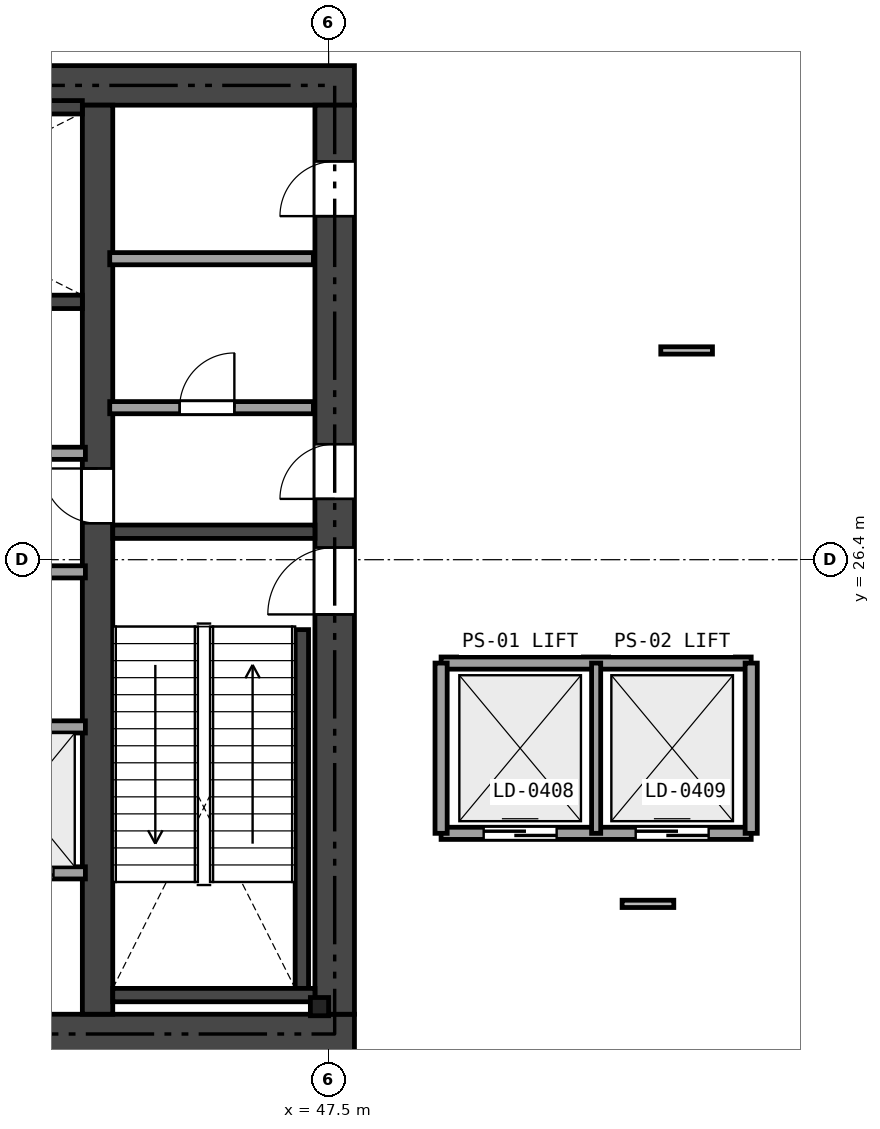
"""IFC4 building model, lengths in metres.
Left out: names, types, materials, properties, quantities, classifications, styles, units other than length and angle.
Written with IfcOpenShell. Run it as: python <this file> out.ifc"""

import sys

from ifc_helpers import new_model, si_unit, direction, frame, frame_2d, origin, origin_2d, place, context, subcontext, project, spatial, rectangle, i_section, extrude, element, fill, save


model = new_model("IFC4")
c1 = context("Model", 3, precision=1e-05, world=origin(), true_north=direction((0.0, 1.0)))
c2 = subcontext(c1, "Body", "Model", "MODEL_VIEW")
j1 = project(units=[si_unit("LENGTHUNIT", "METRE"), si_unit("PLANEANGLEUNIT", "RADIAN")], contexts=[c1])
p1 = place(None, origin())
s1 = spatial("IfcSite", under=j1, at=p1, CompositionType="ELEMENT")
p2 = place(p1, origin())
s2 = spatial("IfcBuilding", under=s1, at=p2, CompositionType="ELEMENT")
p3 = place(p2, frame((0.0, 0.0, 21.6)))
s3 = spatial("IfcBuildingStorey", under=s2, at=p3, CompositionType="ELEMENT", Elevation=21.6)
p4 = place(p3, frame((26.475, 18.6, 0.0), z_axis=(0.0, 0.0, 1.0), x_axis=(1.0, 0.0, 0.0)))
e1 = element("IfcWall", 1, at=p4, inside=s3, PredefinedType="SHEAR", context=c2, shape_type="SweptSolid", body=[
    extrude(rectangle(XDim=21.45, YDim=0.65, at=frame_2d((10.725, 0.0))), origin(), (0.0, 0.0, 1.0), 4.98),
])
p5 = place(p4, frame((12.45, 0.0, 0.0)))
e2 = element("IfcOpeningElement", 2, at=p5, cuts=e1, PredefinedType="OPENING", context=c2, shape_type="SweptSolid", body=[
    extrude(rectangle(XDim=1.15, YDim=2.15, at=frame_2d((0.575, 1.075))), frame((0.0, 0.335, 0.0), z_axis=(0.0, -1.0, 0.0), x_axis=(1.0, 0.0, 0.0)), (0.0, 0.0, 1.0), 0.67),
])
p6 = place(p4, frame((5.275, 0.0, 0.0)))
e3 = element("IfcOpeningElement", 3, at=p6, cuts=e1, PredefinedType="OPENING", context=c2, shape_type="SweptSolid", body=[
    extrude(rectangle(XDim=0.9, YDim=2.1, at=frame_2d((0.45, 1.05))), frame((0.0, 0.335, 0.0), z_axis=(0.0, -1.0, 0.0), x_axis=(1.0, 0.0, 0.0)), (0.0, 0.0, 1.0), 0.67),
])
p7 = place(p3, frame((26.475, 34.2, 0.0), z_axis=(0.0, 0.0, 1.0), x_axis=(1.0, 0.0, 0.0)))
e4 = element("IfcWall", 4, at=p7, inside=s3, PredefinedType="SHEAR", context=c2, shape_type="SweptSolid", body=[
    extrude(rectangle(XDim=21.45, YDim=0.65, at=frame_2d((10.725, 0.0))), origin(), (0.0, 0.0, 1.0), 4.98),
])
p8 = place(p7, frame((9.725, 0.0, 0.0)))
e5 = element("IfcOpeningElement", 5, at=p8, cuts=e4, PredefinedType="OPENING", context=c2, shape_type="SweptSolid", body=[
    extrude(rectangle(XDim=1.1, YDim=2.15, at=frame_2d((0.55, 1.075))), frame((0.0, 0.335, 0.0), z_axis=(0.0, -1.0, 0.0), x_axis=(1.0, 0.0, 0.0)), (0.0, 0.0, 1.0), 0.67),
])
p9 = place(p7, frame((1.975, 0.0, 0.0)))
e6 = element("IfcOpeningElement", 6, at=p9, cuts=e4, PredefinedType="OPENING", context=c2, shape_type="SweptSolid", body=[
    extrude(rectangle(XDim=0.9, YDim=2.1, at=frame_2d((0.45, 1.05))), frame((0.0, 0.335, 0.0), z_axis=(0.0, -1.0, 0.0), x_axis=(1.0, 0.0, 0.0)), (0.0, 0.0, 1.0), 0.67),
])
p10 = place(p7, frame((6.275, 0.0, 0.0)))
e7 = element("IfcOpeningElement", 7, at=p10, cuts=e4, PredefinedType="OPENING", context=c2, shape_type="SweptSolid", body=[
    extrude(rectangle(XDim=0.9, YDim=2.1, at=frame_2d((0.45, 1.05))), frame((0.0, 0.335, 0.0), z_axis=(0.0, -1.0, 0.0), x_axis=(1.0, 0.0, 0.0)), (0.0, 0.0, 1.0), 0.67),
])
p11 = place(p3, frame((47.6, 18.925, 0.0), z_axis=(0.0, 0.0, 1.0), x_axis=(0.0, 1.0, 0.0)))
e8 = element("IfcWall", 8, at=p11, inside=s3, PredefinedType="SHEAR", context=c2, shape_type="SweptSolid", body=[
    extrude(rectangle(XDim=14.95, YDim=0.65, at=frame_2d((7.475, 0.0))), origin(), (0.0, 0.0, 1.0), 4.98),
])
p12 = place(p11, frame((6.575, 0.0, 0.0)))
e9 = element("IfcOpeningElement", 9, at=p12, cuts=e8, PredefinedType="OPENING", context=c2, shape_type="SweptSolid", body=[
    extrude(rectangle(XDim=1.1, YDim=2.15, at=frame_2d((0.55, 1.075))), frame((0.0, 0.335, 0.0), z_axis=(0.0, -1.0, 0.0), x_axis=(1.0, 0.0, 0.0)), (0.0, 0.0, 1.0), 0.67),
])
p13 = place(p11, frame((8.475, 0.0, 0.0)))
e10 = element("IfcOpeningElement", 10, at=p13, cuts=e8, PredefinedType="OPENING", context=c2, shape_type="SweptSolid", body=[
    extrude(rectangle(XDim=0.9, YDim=2.1, at=frame_2d((0.45, 1.05))), frame((0.0, 0.335, 0.0), z_axis=(0.0, -1.0, 0.0), x_axis=(1.0, 0.0, 0.0)), (0.0, 0.0, 1.0), 0.67),
])
p14 = place(p11, frame((13.125, 0.0, 0.0)))
e11 = element("IfcOpeningElement", 11, at=p14, cuts=e8, PredefinedType="OPENING", context=c2, shape_type="SweptSolid", body=[
    extrude(rectangle(XDim=0.9, YDim=2.1, at=frame_2d((0.45, 1.05))), frame((0.0, 0.335, 0.0), z_axis=(0.0, -1.0, 0.0), x_axis=(1.0, 0.0, 0.0)), (0.0, 0.0, 1.0), 0.67),
])
p15 = place(p3, frame((43.7, 18.925, 0.0), z_axis=(0.0, 0.0, 1.0), x_axis=(0.0, 1.0, 0.0)))
e12 = element("IfcWall", 12, at=p15, inside=s3, PredefinedType="SHEAR", context=c2, shape_type="SweptSolid", body=[
    extrude(rectangle(XDim=14.95, YDim=0.5, at=frame_2d((7.475, 0.0))), origin(), (0.0, 0.0, 1.0), 4.98),
])
p16 = place(p15, frame((8.075, 0.0, 0.0)))
e13 = element("IfcOpeningElement", 13, at=p16, cuts=e12, PredefinedType="OPENING", context=c2, shape_type="SweptSolid", body=[
    extrude(rectangle(XDim=0.9, YDim=2.1, at=frame_2d((0.45, 1.05))), frame((0.0, 0.26, 0.0), z_axis=(0.0, -1.0, 0.0), x_axis=(1.0, 0.0, 0.0)), (0.0, 0.0, 1.0), 0.52),
])
p17 = place(p3, frame((43.95, 26.86, 0.0), z_axis=(0.0, 0.0, 1.0), x_axis=(1.0, 0.0, 0.0)))
e14 = element("IfcWall", 14, at=p17, inside=s3, PredefinedType="SHEAR", context=c2, shape_type="SweptSolid", body=[
    extrude(rectangle(XDim=3.325, YDim=0.22, at=frame_2d((1.663, 0.0))), origin(), (0.0, 0.0, 1.0), 4.98),
])
p18 = place(p3, frame((47.06, 19.35, 0.0), z_axis=(0.0, 0.0, 1.0), x_axis=(0.0, 1.0, 0.0)))
e15 = element("IfcWall", 15, at=p18, inside=s3, PredefinedType="SHEAR", context=c2, shape_type="SweptSolid", body=[
    extrude(rectangle(XDim=5.9, YDim=0.22, at=frame_2d((2.95, 0.0))), origin(), (0.0, 0.0, 1.0), 4.98),
])
p19 = place(p3, frame((43.95, 19.24, 0.0), z_axis=(0.0, 0.0, 1.0), x_axis=(1.0, 0.0, 0.0)))
e16 = element("IfcWall", 16, at=p19, inside=s3, PredefinedType="SHEAR", context=c2, shape_type="SweptSolid", body=[
    extrude(rectangle(XDim=3.325, YDim=0.22, at=frame_2d((1.663, 0.0))), origin(), (0.0, 0.0, 1.0), 4.98),
])
p20 = place(p3, frame((35.84, 30.64, 0.0), z_axis=(0.0, 0.0, 1.0), x_axis=(1.0, 0.0, 0.0)))
e17 = element("IfcWall", 17, at=p20, inside=s3, PredefinedType="SHEAR", context=c2, shape_type="SweptSolid", body=[
    extrude(rectangle(XDim=7.61, YDim=0.22, at=frame_2d((3.805, 0.0))), origin(), (0.0, 0.0, 1.0), 4.98),
])
p21 = place(p3, frame((37.55, 33.84, 0.0), z_axis=(0.0, 0.0, 1.0), x_axis=(1.0, 0.0, 0.0)))
e18 = element("IfcWall", 18, at=p21, inside=s3, PredefinedType="SHEAR", context=c2, shape_type="SweptSolid", body=[
    extrude(rectangle(XDim=5.9, YDim=0.22, at=frame_2d((2.95, 0.0))), origin(), (0.0, 0.0, 1.0), 4.98),
])
p22 = place(p3, frame((47.35, 19.05, 0.0), z_axis=(0.0, 0.0, 1.0), x_axis=(1.0, 0.0, 0.0)))
e19 = element("IfcColumn", 19, at=p22, inside=s3, PredefinedType="PILASTER", context=c2, shape_type="SweptSolid", body=[
    extrude(i_section(OverallWidth=0.3, OverallDepth=0.3, WebThickness=0.011, FlangeThickness=0.019, at=origin_2d()), origin(), (0.0, 0.0, 1.0), 4.98),
])
p23 = place(p3, frame((43.9, 28.9, 0.0), z_axis=(0.0, 0.0, 1.0), x_axis=(1.0, 0.0, 0.0)))
e20 = element("IfcWall", 20, at=p23, inside=s3, PredefinedType="SOLIDWALL", context=c2, shape_type="SweptSolid", body=[
    extrude(rectangle(XDim=3.35, YDim=0.2, at=frame_2d((1.675, 0.0))), origin(), (0.0, 0.0, 1.0), 4.98),
])
p24 = place(p23, frame((1.15, 0.0, 0.0)))
e21 = element("IfcOpeningElement", 21, at=p24, cuts=e20, PredefinedType="OPENING", context=c2, shape_type="SweptSolid", body=[
    extrude(rectangle(XDim=0.9, YDim=2.1, at=frame_2d((0.45, 1.05))), frame((0.0, 0.11, 0.0), z_axis=(0.0, -1.0, 0.0), x_axis=(1.0, 0.0, 0.0)), (0.0, 0.0, 1.0), 0.22),
])
p25 = place(p3, frame((43.9, 31.35, 0.0), z_axis=(0.0, 0.0, 1.0), x_axis=(1.0, 0.0, 0.0)))
e22 = element("IfcWall", 22, at=p25, inside=s3, PredefinedType="SOLIDWALL", context=c2, shape_type="SweptSolid", body=[
    extrude(rectangle(XDim=3.35, YDim=0.2, at=frame_2d((1.675, 0.0))), origin(), (0.0, 0.0, 1.0), 4.98),
])
for number, where, z_axis, x_axis in (
    (23, (35.62, 28.15, 0.0), (0.0, 0.0, 1.0), (1.0, 0.0, 0.0)),
    (24, (35.62, 26.2, 0.0), (0.0, 0.0, 1.0), (1.0, 0.0, 0.0)),
):
    element("IfcWall", number, at=place(p3, frame(where, z_axis=z_axis, x_axis=x_axis)), inside=s3, PredefinedType="SOLIDWALL", context=c2, shape_type="SweptSolid", body=[
        extrude(rectangle(XDim=7.88, YDim=0.2, at=frame_2d((3.94, 0.0))), origin(), (0.0, 0.0, 1.0), 4.98),
    ])
p26 = place(p3, frame((35.62, 23.65, 0.0), z_axis=(0.0, 0.0, 1.0), x_axis=(1.0, 0.0, 0.0)))
e25 = element("IfcWall", 25, at=p26, inside=s3, PredefinedType="SOLIDWALL", context=c2, shape_type="SweptSolid", body=[
    extrude(rectangle(XDim=7.88, YDim=0.2, at=frame_2d((3.94, 0.0))), origin(), (0.0, 0.0, 1.0), 4.501),
])
p27 = place(p3, frame((35.62, 21.25, 0.0), z_axis=(0.0, 0.0, 1.0), x_axis=(1.0, 0.0, 0.0)))
e26 = element("IfcWall", 26, at=p27, inside=s3, PredefinedType="SOLIDWALL", context=c2, shape_type="SweptSolid", body=[
    extrude(rectangle(XDim=7.88, YDim=0.2, at=frame_2d((3.94, 0.0))), origin(), (0.0, 0.0, 1.0), 4.98),
])
p28 = place(p27, frame((0.405, 0.0, 0.0)))
e27 = element("IfcOpeningElement", 27, at=p28, cuts=e26, PredefinedType="OPENING", context=c2, shape_type="SweptSolid", body=[
    extrude(rectangle(XDim=1.1, YDim=2.15, at=frame_2d((0.55, 1.075))), frame((0.0, 0.11, 0.0), z_axis=(0.0, -1.0, 0.0), x_axis=(1.0, 0.0, 0.0)), (0.0, 0.0, 1.0), 0.22),
])
p29 = place(p27, frame((2.355, 0.0, 0.0)))
e28 = element("IfcOpeningElement", 28, at=p29, cuts=e26, PredefinedType="OPENING", context=c2, shape_type="SweptSolid", body=[
    extrude(rectangle(XDim=1.1, YDim=2.15, at=frame_2d((0.55, 1.075))), frame((0.0, 0.11, 0.0), z_axis=(0.0, -1.0, 0.0), x_axis=(1.0, 0.0, 0.0)), (0.0, 0.0, 1.0), 0.22),
])
p30 = place(p27, frame((4.305, 0.0, 0.0)))
e29 = element("IfcOpeningElement", 29, at=p30, cuts=e26, PredefinedType="OPENING", context=c2, shape_type="SweptSolid", body=[
    extrude(rectangle(XDim=1.1, YDim=2.15, at=frame_2d((0.55, 1.075))), frame((0.0, 0.11, 0.0), z_axis=(0.0, -1.0, 0.0), x_axis=(1.0, 0.0, 0.0)), (0.0, 0.0, 1.0), 0.22),
])
p31 = place(p27, frame((6.255, 0.0, 0.0)))
e30 = element("IfcOpeningElement", 30, at=p31, cuts=e26, PredefinedType="OPENING", context=c2, shape_type="SweptSolid", body=[
    extrude(rectangle(XDim=1.1, YDim=2.15, at=frame_2d((0.55, 1.075))), frame((0.0, 0.11, 0.0), z_axis=(0.0, -1.0, 0.0), x_axis=(1.0, 0.0, 0.0)), (0.0, 0.0, 1.0), 0.22),
])
p32 = place(p3, frame((49.35, 24.7, 0.0), z_axis=(0.0, 0.0, 1.0), x_axis=(1.0, 0.0, 0.0)))
e31 = element("IfcWall", 31, at=p32, inside=s3, PredefinedType="SOLIDWALL", context=c2, shape_type="SweptSolid", body=[
    extrude(rectangle(XDim=5.1, YDim=0.2, at=frame_2d((2.55, 0.0))), origin(), (0.0, 0.0, 1.0), 4.98),
])
p33 = place(p3, frame((49.35, 21.9, 0.0), z_axis=(0.0, 0.0, 1.0), x_axis=(1.0, 0.0, 0.0)))
e32 = element("IfcWall", 32, at=p33, inside=s3, PredefinedType="SOLIDWALL", context=c2, shape_type="SweptSolid", body=[
    extrude(rectangle(XDim=5.1, YDim=0.2, at=frame_2d((2.55, 0.0))), origin(), (0.0, 0.0, 1.0), 3.847),
])
p34 = place(p33, frame((0.7, 0.0, 0.0)))
e33 = element("IfcOpeningElement", 33, at=p34, cuts=e32, PredefinedType="OPENING", context=c2, shape_type="SweptSolid", body=[
    extrude(rectangle(XDim=1.2, YDim=2.15, at=frame_2d((0.6, 1.075))), frame((0.0, 0.11, 0.0), z_axis=(0.0, -1.0, 0.0), x_axis=(1.0, 0.0, 0.0)), (0.0, 0.0, 1.0), 0.22),
])
p35 = place(p33, frame((3.2, 0.0, 0.0)))
e34 = element("IfcOpeningElement", 34, at=p35, cuts=e32, PredefinedType="OPENING", context=c2, shape_type="SweptSolid", body=[
    extrude(rectangle(XDim=1.2, YDim=2.15, at=frame_2d((0.6, 1.075))), frame((0.0, 0.11, 0.0), z_axis=(0.0, -1.0, 0.0), x_axis=(1.0, 0.0, 0.0)), (0.0, 0.0, 1.0), 0.22),
])
p36 = place(p3, frame((49.35, 21.9, 0.0), z_axis=(0.0, 0.0, 1.0), x_axis=(0.0, 1.0, 0.0)))
e35 = element("IfcWall", 35, at=p36, inside=s3, PredefinedType="SOLIDWALL", context=c2, shape_type="SweptSolid", body=[
    extrude(rectangle(XDim=2.8, YDim=0.2, at=frame_2d((1.4, 0.0))), origin(), (0.0, 0.0, 1.0), 3.847),
])
p37 = place(p3, frame((54.45, 21.9, 0.0), z_axis=(0.0, 0.0, 1.0), x_axis=(0.0, 1.0, 0.0)))
e36 = element("IfcWall", 36, at=p37, inside=s3, PredefinedType="SOLIDWALL", context=c2, shape_type="SweptSolid", body=[
    extrude(rectangle(XDim=2.8, YDim=0.2, at=frame_2d((1.4, 0.0))), origin(), (0.0, 0.0, 1.0), 4.98),
])
p38 = place(p3, frame((51.9, 21.9, 0.0), z_axis=(0.0, 0.0, 1.0), x_axis=(0.0, 1.0, 0.0)))
e37 = element("IfcWall", 37, at=p38, inside=s3, PredefinedType="PARTITIONING", context=c2, shape_type="SweptSolid", body=[
    extrude(rectangle(XDim=2.8, YDim=0.15, at=frame_2d((1.4, 0.0))), origin(), (0.0, 0.0, 1.0), 4.98),
])
p39 = place(p12, origin())
e38 = element("IfcDoor", 38, at=p39, inside=s3, OperationType="SINGLE_SWING_LEFT", PredefinedType="DOOR", context=c2, shape_type="SweptSolid", body=[
    extrude(rectangle(XDim=1.1, YDim=2.15, at=frame_2d((0.55, 1.075))), frame((0.0, 0.025, 0.0), z_axis=(0.0, -1.0, 0.0), x_axis=(1.0, 0.0, 0.0)), (0.0, 0.0, 1.0), 0.05),
])
fill(e9, e38)
p40 = place(p16, origin())
e39 = element("IfcDoor", 39, at=p40, inside=s3, OperationType="SINGLE_SWING_RIGHT", PredefinedType="DOOR", context=c2, shape_type="SweptSolid", body=[
    extrude(rectangle(XDim=0.9, YDim=2.1, at=frame_2d((0.45, 1.05))), frame((0.0, 0.025, 0.0), z_axis=(0.0, -1.0, 0.0), x_axis=(1.0, 0.0, 0.0)), (0.0, 0.0, 1.0), 0.05),
])
fill(e13, e39)
p41 = place(p13, origin())
e40 = element("IfcDoor", 40, at=p41, inside=s3, OperationType="SINGLE_SWING_LEFT", PredefinedType="DOOR", context=c2, shape_type="SweptSolid", body=[
    extrude(rectangle(XDim=0.9, YDim=2.1, at=frame_2d((0.45, 1.05))), frame((0.0, 0.025, 0.0), z_axis=(0.0, -1.0, 0.0), x_axis=(1.0, 0.0, 0.0)), (0.0, 0.0, 1.0), 0.05),
])
fill(e10, e40)
p42 = place(p24, origin())
e41 = element("IfcDoor", 41, at=p42, inside=s3, OperationType="SINGLE_SWING_RIGHT", PredefinedType="DOOR", context=c2, shape_type="SweptSolid", body=[
    extrude(rectangle(XDim=0.9, YDim=2.1, at=frame_2d((0.45, 1.05))), frame((0.0, 0.025, 0.0), z_axis=(0.0, -1.0, 0.0), x_axis=(1.0, 0.0, 0.0)), (0.0, 0.0, 1.0), 0.05),
])
fill(e21, e41)
p43 = place(p14, origin())
e42 = element("IfcDoor", 42, at=p43, inside=s3, OperationType="SINGLE_SWING_LEFT", PredefinedType="DOOR", context=c2, shape_type="SweptSolid", body=[
    extrude(rectangle(XDim=0.9, YDim=2.1, at=frame_2d((0.45, 1.05))), frame((0.0, 0.025, 0.0), z_axis=(0.0, -1.0, 0.0), x_axis=(1.0, 0.0, 0.0)), (0.0, 0.0, 1.0), 0.05),
])
fill(e11, e42)
p44 = place(p31, origin())
e43 = element("IfcDoor", 43, at=p44, inside=s3, OperationType="SLIDING_TO_LEFT", PredefinedType="DOOR", context=c2, shape_type="SweptSolid", body=[
    extrude(rectangle(XDim=1.1, YDim=2.15, at=frame_2d((0.55, 1.075))), frame((0.0, 0.025, 0.0), z_axis=(0.0, -1.0, 0.0), x_axis=(1.0, 0.0, 0.0)), (0.0, 0.0, 1.0), 0.05),
])
fill(e30, e43)
p45 = place(p34, origin())
e44 = element("IfcDoor", 44, at=p45, inside=s3, OperationType="SLIDING_TO_LEFT", PredefinedType="DOOR", context=c2, shape_type="SweptSolid", body=[
    extrude(rectangle(XDim=1.2, YDim=2.15, at=frame_2d((0.6, 1.075))), frame((0.0, 0.025, 0.0), z_axis=(0.0, -1.0, 0.0), x_axis=(1.0, 0.0, 0.0)), (0.0, 0.0, 1.0), 0.05),
])
fill(e33, e44)
p46 = place(p35, origin())
e45 = element("IfcDoor", 45, at=p46, inside=s3, OperationType="SLIDING_TO_LEFT", PredefinedType="DOOR", context=c2, shape_type="SweptSolid", body=[
    extrude(rectangle(XDim=1.2, YDim=2.15, at=frame_2d((0.6, 1.075))), frame((0.0, 0.025, 0.0), z_axis=(0.0, -1.0, 0.0), x_axis=(1.0, 0.0, 0.0)), (0.0, 0.0, 1.0), 0.05),
])
fill(e34, e45)
save(model, sys.argv[1])
